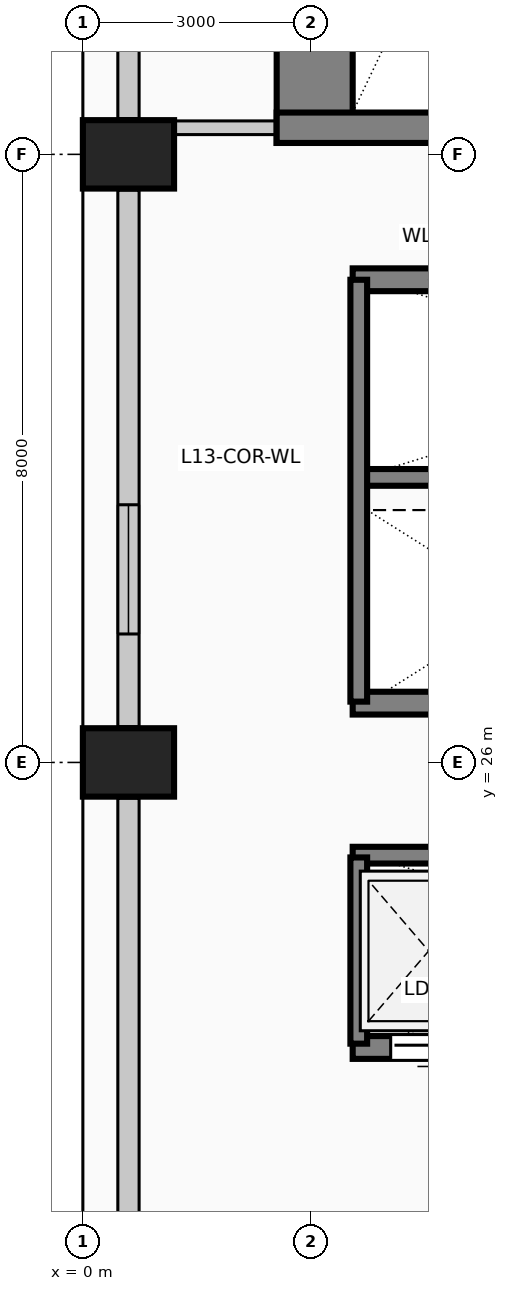
"""IFC4 building model, lengths in metres.
Left out: names, types, materials, properties, quantities, classifications, styles, units other than length and angle.
Written with IfcOpenShell. Run it as: python <this file> out.ifc"""

import sys

from ifc_helpers import new_model, si_unit, direction, frame, frame_2d, origin, origin_2d, place, context, subcontext, project, spatial, rectangle, extrude, element, fill, save


model = new_model("IFC4")
c1 = context("Model", 3, precision=1e-05, world=origin(), true_north=direction((0.0, 1.0)))
c2 = subcontext(c1, "Body", "Model", "MODEL_VIEW")
j1 = project(units=[si_unit("LENGTHUNIT", "METRE"), si_unit("PLANEANGLEUNIT", "RADIAN")], contexts=[c1])
p1 = place(None, origin())
s1 = spatial("IfcSite", under=j1, at=p1, CompositionType="ELEMENT")
p2 = place(p1, origin())
s2 = spatial("IfcBuilding", under=s1, at=p2, CompositionType="ELEMENT")
p3 = place(p2, frame((0.0, 0.0, 54.6)))
s3 = spatial("IfcBuildingStorey", under=s2, at=p3, CompositionType="ELEMENT", Elevation=54.6)
p4 = place(p3, frame((3.05, 34.15, 0.0), z_axis=(0.0, 0.0, 1.0), x_axis=(0.0, 1.0, 0.0)))
e1 = element("IfcWall", 1, at=p4, inside=s3, PredefinedType="SHEAR", context=c2, shape_type="SweptSolid", body=[
    extrude(rectangle(XDim=9.28, YDim=1.0, at=frame_2d((4.64, 0.0))), origin(), (0.0, 0.0, 1.0), 4.0),
])
p5 = place(p3, frame((2.55, 34.35, 0.0), z_axis=(0.0, 0.0, 1.0), x_axis=(1.0, 0.0, 0.0)))
e2 = element("IfcWall", 2, at=p5, inside=s3, PredefinedType="SHEAR", context=c2, shape_type="SweptSolid", body=[
    extrude(rectangle(XDim=5.16, YDim=0.4, at=frame_2d((2.58, 0.0))), origin(), (0.0, 0.0, 1.0), 4.0),
])
p6 = place(p5, frame((2.4, 0.0, 0.0)))
e3 = element("IfcOpeningElement", 3, at=p6, cuts=e2, PredefinedType="OPENING", context=c2, shape_type="SweptSolid", body=[
    extrude(rectangle(XDim=1.15, YDim=2.2, at=frame_2d((0.575, 1.1))), frame((0.0, 0.21, 0.0), z_axis=(0.0, -1.0, 0.0), x_axis=(1.0, 0.0, 0.0)), (0.0, 0.0, 1.0), 0.42),
])
for number, where, z_axis, x_axis in (
    (4, (0.6, 26.0, 0.0), (0.0, 0.0, 1.0), (0.0, 1.0, 0.0)),
    (5, (0.6, 34.0, 0.0), (0.0, 0.0, 1.0), (0.0, 1.0, 0.0)),
):
    element("IfcColumn", number, at=place(p3, frame(where, z_axis=z_axis, x_axis=x_axis)), inside=s3, PredefinedType="COLUMN", context=c2, shape_type="SweptSolid", body=[
        extrude(rectangle(XDim=0.9, YDim=1.2, at=origin_2d()), origin(), (0.0, 0.0, 1.0), 4.0),
    ])
p7 = place(p3, frame((0.6, 18.47, 0.0), z_axis=(0.0, 0.0, 1.0), x_axis=(0.0, 1.0, 0.0)))
e6 = element("IfcWall", 6, at=p7, inside=s3, PredefinedType="SOLIDWALL", context=c2, shape_type="SweptSolid", body=[
    extrude(rectangle(XDim=7.06, YDim=0.28, at=frame_2d((3.53, 0.0))), origin(), (0.0, 0.0, 1.0), 2.85),
])
p8 = place(p3, frame((0.6, 26.47, 0.0), z_axis=(0.0, 0.0, 1.0), x_axis=(0.0, 1.0, 0.0)))
e7 = element("IfcWall", 7, at=p8, inside=s3, PredefinedType="SOLIDWALL", context=c2, shape_type="SweptSolid", body=[
    extrude(rectangle(XDim=7.06, YDim=0.28, at=frame_2d((3.53, 0.0))), origin(), (0.0, 0.0, 1.0), 2.85),
])
p9 = place(p8, frame((1.22, 0.0, 0.5)))
e8 = element("IfcOpeningElement", 8, at=p9, cuts=e7, PredefinedType="OPENING", context=c2, shape_type="SweptSolid", body=[
    extrude(rectangle(XDim=1.7, YDim=1.95, at=frame_2d((0.85, 0.975))), frame((0.0, 0.15, 0.0), z_axis=(0.0, -1.0, 0.0), x_axis=(1.0, 0.0, 0.0)), (0.0, 0.0, 1.0), 0.3),
])
p10 = place(p3, frame((0.6, 34.47, 0.0), z_axis=(0.0, 0.0, 1.0), x_axis=(0.0, 1.0, 0.0)))
e9 = element("IfcWall", 9, at=p10, inside=s3, PredefinedType="SOLIDWALL", context=c2, shape_type="SweptSolid", body=[
    extrude(rectangle(XDim=7.46, YDim=0.28, at=frame_2d((3.73, 0.0))), origin(), (0.0, 0.0, 1.0), 2.85),
])
p11 = place(p3, frame((5.65, 22.25, 0.0), z_axis=(0.0, 0.0, 1.0), x_axis=(-1.0, 0.0, 0.0)))
e10 = element("IfcWall", 10, at=p11, inside=s3, PredefinedType="SOLIDWALL", context=c2, shape_type="SweptSolid", body=[
    extrude(rectangle(XDim=2.1, YDim=0.3, at=frame_2d((1.05, 0.0))), origin(), (0.0, 0.0, 1.0), 4.0),
])
p12 = place(p11, frame((0.5, 0.0, 0.0)))
e11 = element("IfcOpeningElement", 11, at=p12, cuts=e10, PredefinedType="OPENING", context=c2, shape_type="SweptSolid", body=[
    extrude(rectangle(XDim=1.1, YDim=2.2, at=frame_2d((0.55, 1.1))), frame((0.0, 0.16, 0.0), z_axis=(0.0, -1.0, 0.0), x_axis=(1.0, 0.0, 0.0)), (0.0, 0.0, 1.0), 0.32),
])
for number, where, z_axis, x_axis in (
    (12, (3.55, 32.35, 0.0), (0.0, 0.0, 1.0), (1.0, 0.0, 0.0)),
    (13, (5.65, 26.78, 0.0), (0.0, 0.0, 1.0), (-1.0, 0.0, 0.0)),
):
    element("IfcWall", number, at=place(p3, frame(where, z_axis=z_axis, x_axis=x_axis)), inside=s3, PredefinedType="SOLIDWALL", context=c2, shape_type="SweptSolid", body=[
        extrude(rectangle(XDim=2.1, YDim=0.3, at=frame_2d((1.05, 0.0))), origin(), (0.0, 0.0, 1.0), 4.0),
    ])
p13 = place(p3, frame((3.55, 29.75, 0.0), z_axis=(0.0, 0.0, 1.0), x_axis=(1.0, 0.0, 0.0)))
e14 = element("IfcWall", 14, at=p13, inside=s3, PredefinedType="SOLIDWALL", context=c2, shape_type="SweptSolid", body=[
    extrude(rectangle(XDim=8.65, YDim=0.22, at=frame_2d((4.325, 0.0))), origin(), (0.0, 0.0, 1.0), 4.0),
])
p14 = place(p3, frame((3.63, 26.8, 0.0), z_axis=(0.0, 0.0, 1.0), x_axis=(0.0, 1.0, 0.0)))
e15 = element("IfcWall", 15, at=p14, inside=s3, PredefinedType="SOLIDWALL", context=c2, shape_type="SweptSolid", body=[
    extrude(rectangle(XDim=5.55, YDim=0.22, at=frame_2d((2.775, 0.0))), origin(), (0.0, 0.0, 1.0), 4.0),
])
p15 = place(p3, frame((3.55, 24.78, 0.0), z_axis=(0.0, 0.0, 1.0), x_axis=(1.0, 0.0, 0.0)))
e16 = element("IfcWall", 16, at=p15, inside=s3, PredefinedType="SOLIDWALL", context=c2, shape_type="SweptSolid", body=[
    extrude(rectangle(XDim=8.65, YDim=0.22, at=frame_2d((4.325, 0.0))), origin(), (0.0, 0.0, 1.0), 4.0),
])
p16 = place(p3, frame((3.63, 22.3, 0.0), z_axis=(0.0, 0.0, 1.0), x_axis=(0.0, 1.0, 0.0)))
e17 = element("IfcWall", 17, at=p16, inside=s3, PredefinedType="SOLIDWALL", context=c2, shape_type="SweptSolid", body=[
    extrude(rectangle(XDim=2.45, YDim=0.22, at=frame_2d((1.225, 0.0))), origin(), (0.0, 0.0, 1.0), 4.0),
])
p17 = place(p3, frame((1.2, 34.35, 0.0), z_axis=(0.0, 0.0, 1.0), x_axis=(1.0, 0.0, 0.0)))
e18 = element("IfcWall", 18, at=p17, inside=s3, PredefinedType="PARTITIONING", context=c2, shape_type="SweptSolid", body=[
    extrude(rectangle(XDim=1.35, YDim=0.18, at=frame_2d((0.675, 0.0))), origin(), (0.0, 0.0, 1.0), 3.7),
])
p18 = place(p9, origin())
e19 = element("IfcWindow", 19, at=p18, inside=s3, PartitioningType="SINGLE_PANEL", PredefinedType="WINDOW", context=c2, shape_type="SweptSolid", body=[
    extrude(rectangle(XDim=1.7, YDim=1.95, at=frame_2d((0.85, 0.975))), frame((0.0, 0.03, 0.0), z_axis=(0.0, -1.0, 0.0), x_axis=(1.0, 0.0, 0.0)), (0.0, 0.0, 1.0), 0.06),
])
fill(e8, e19)
p19 = place(p12, origin())
e20 = element("IfcDoor", 20, at=p19, inside=s3, OperationType="SLIDING_TO_LEFT", PredefinedType="DOOR", context=c2, shape_type="SweptSolid", body=[
    extrude(rectangle(XDim=1.1, YDim=2.2, at=frame_2d((0.55, 1.1))), frame((0.0, 0.025, 0.0), z_axis=(0.0, -1.0, 0.0), x_axis=(1.0, 0.0, 0.0)), (0.0, 0.0, 1.0), 0.05),
])
fill(e11, e20)
save(model, sys.argv[1])
